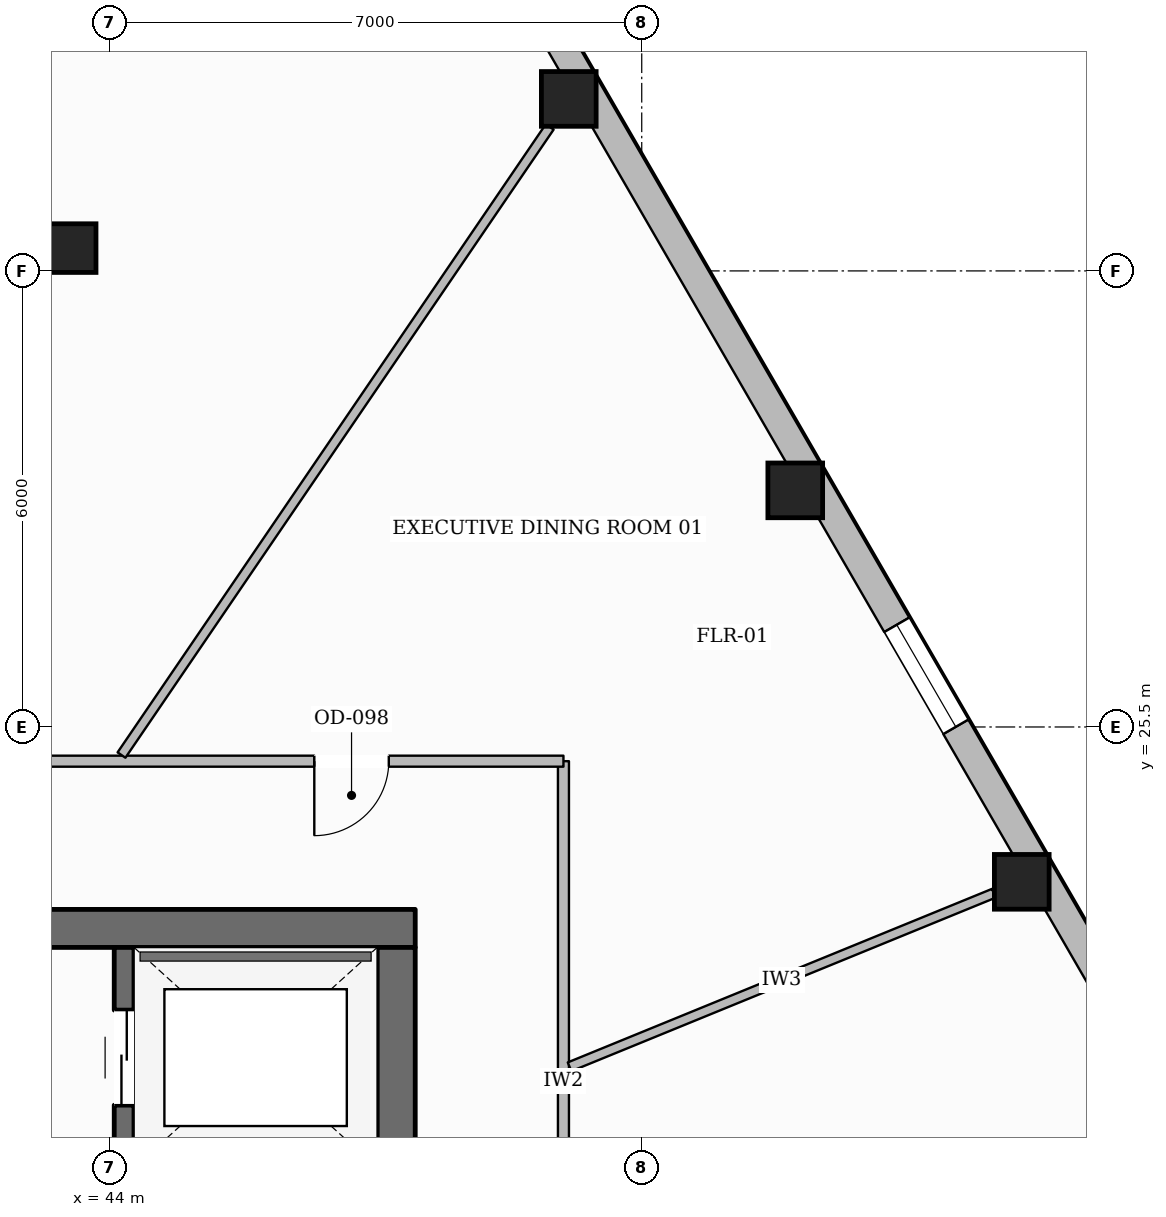
"""IFC4 building model, lengths in metres.
Left out: names, types, materials, properties, quantities, classifications, styles, units other than length and angle.
Written with IfcOpenShell. Run it as: python <this file> out.ifc"""

import sys

from ifc_helpers import new_model, si_unit, direction, frame, frame_2d, origin, origin_2d, place, context, subcontext, project, spatial, rectangle, hollow_rectangle, extrude, element, fill, save


model = new_model("IFC4")
c1 = context("Model", 3, precision=1e-05, world=origin(), true_north=direction((0.0, 1.0)))
c2 = subcontext(c1, "Body", "Model", "MODEL_VIEW")
j1 = project(units=[si_unit("LENGTHUNIT", "METRE"), si_unit("PLANEANGLEUNIT", "RADIAN")], contexts=[c1])
p1 = place(None, origin())
s1 = spatial("IfcSite", under=j1, at=p1, CompositionType="ELEMENT")
p2 = place(p1, origin())
s2 = spatial("IfcBuilding", under=s1, at=p2, CompositionType="ELEMENT")
p3 = place(p2, frame((0.0, 0.0, 112.45)))
s3 = spatial("IfcBuildingStorey", under=s2, at=p3, CompositionType="ELEMENT", Elevation=112.45)
p4 = place(p3, frame((27.98, 22.85, 0.0), z_axis=(0.0, 0.0, 1.0), x_axis=(1.0, 0.0, 0.0)))
e1 = element("IfcWall", 1, at=p4, inside=s3, PredefinedType="SOLIDWALL", context=c2, shape_type="SweptSolid", body=[
    extrude(rectangle(XDim=20.04, YDim=0.5, at=frame_2d((10.02, 0.0))), origin(), (0.0, 0.0, 1.0), 3.6),
])
p5 = place(p4, frame((6.295, 0.0, 0.0)))
e2 = element("IfcOpeningElement", 2, at=p5, cuts=e1, PredefinedType="OPENING", context=c2, shape_type="SweptSolid", body=[
    extrude(rectangle(XDim=1.05, YDim=2.15, at=frame_2d((0.525, 1.075))), frame((0.0, 0.26, 0.0), z_axis=(0.0, -1.0, 0.0), x_axis=(1.0, 0.0, 0.0)), (0.0, 0.0, 1.0), 0.52),
])
p6 = place(p4, frame((12.695, 0.0, 0.0)))
e3 = element("IfcOpeningElement", 3, at=p6, cuts=e1, PredefinedType="OPENING", context=c2, shape_type="SweptSolid", body=[
    extrude(rectangle(XDim=1.05, YDim=2.15, at=frame_2d((0.525, 1.075))), frame((0.0, 0.26, 0.0), z_axis=(0.0, -1.0, 0.0), x_axis=(1.0, 0.0, 0.0)), (0.0, 0.0, 1.0), 0.52),
])
p7 = place(p3, frame((47.77, 9.6, 0.0), z_axis=(0.0, 0.0, 1.0), x_axis=(0.0, 1.0, 0.0)))
e4 = element("IfcWall", 4, at=p7, inside=s3, PredefinedType="SOLIDWALL", context=c2, shape_type="SweptSolid", body=[
    extrude(rectangle(XDim=13.0, YDim=0.5, at=frame_2d((6.5, 0.0))), origin(), (0.0, 0.0, 1.0), 3.6),
])
p8 = place(p7, frame((0.2, 0.0, 0.0)))
e5 = element("IfcOpeningElement", 5, at=p8, cuts=e4, PredefinedType="OPENING", context=c2, shape_type="SweptSolid", body=[
    extrude(rectangle(XDim=1.1, YDim=2.15, at=frame_2d((0.55, 1.075))), frame((0.0, 0.26, 0.0), z_axis=(0.0, -1.0, 0.0), x_axis=(1.0, 0.0, 0.0)), (0.0, 0.0, 1.0), 0.52),
])
p9 = place(p7, frame((8.4, 0.0, 0.0)))
e6 = element("IfcOpeningElement", 6, at=p9, cuts=e4, PredefinedType="OPENING", context=c2, shape_type="SweptSolid", body=[
    extrude(rectangle(XDim=0.9, YDim=2.1, at=frame_2d((0.45, 1.05))), frame((0.0, 0.26, 0.0), z_axis=(0.0, -1.0, 0.0), x_axis=(1.0, 0.0, 0.0)), (0.0, 0.0, 1.0), 0.52),
])
p10 = place(p3, frame((44.19, 9.6, 0.0), z_axis=(0.0, 0.0, 1.0), x_axis=(0.0, 1.0, 0.0)))
e7 = element("IfcWall", 7, at=p10, inside=s3, PredefinedType="SHEAR", context=c2, shape_type="SweptSolid", body=[
    extrude(rectangle(XDim=13.0, YDim=0.26, at=frame_2d((6.5, 0.0))), origin(), (0.0, 0.0, 1.0), 3.6),
])
p11 = place(p10, frame((10.925, 0.0, 0.0)))
e8 = element("IfcOpeningElement", 8, at=p11, cuts=e7, PredefinedType="OPENING", context=c2, shape_type="SweptSolid", body=[
    extrude(rectangle(XDim=1.25, YDim=2.25, at=frame_2d((0.625, 1.125))), frame((0.0, 0.14, 0.0), z_axis=(0.0, -1.0, 0.0), x_axis=(1.0, 0.0, 0.0)), (0.0, 0.0, 1.0), 0.28),
])
for number, where, z_axis, x_axis in (
    (9, (56.0, 23.463, 0.0), (0.0, 0.0, 1.0), (1.0, 0.0, 0.0)),
    (10, (53.02, 28.613, 0.0), (0.0, 0.0, 1.0), (1.0, 0.0, 0.0)),
    (11, (50.04, 33.763, 0.0), (0.0, 0.0, 1.0), (1.0, 0.0, 0.0)),
):
    element("IfcColumn", number, at=place(p3, frame(where, z_axis=z_axis, x_axis=x_axis)), inside=s3, PredefinedType="COLUMN", context=c2, shape_type="SweptSolid", body=[
        extrude(hollow_rectangle(XDim=0.72, YDim=0.72, WallThickness=0.032, at=origin_2d()), origin(), (0.0, 0.0, 1.0), 3.6),
    ])
p12 = place(p3, frame((43.5, 31.8, 0.0), z_axis=(0.0, 0.0, 1.0), x_axis=(1.0, 0.0, 0.0)))
e12 = element("IfcColumn", 12, at=p12, inside=s3, PredefinedType="COLUMN", context=c2, shape_type="SweptSolid", body=[
    extrude(hollow_rectangle(XDim=0.64, YDim=0.64, WallThickness=0.028, at=origin_2d()), origin(), (0.0, 0.0, 1.0), 3.6),
])
p13 = place(p3, frame((44.076, 44.609, 0.0), z_axis=(0.0, 0.0, 1.0), x_axis=(0.500826973377, -0.865547423737, 0.0)))
e13 = element("IfcWall", 13, at=p13, inside=s3, PredefinedType="STANDARD", context=c2, shape_type="SweptSolid", body=[
    extrude(rectangle(XDim=36.65, YDim=0.38, at=frame_2d((18.325, 0.0))), origin(), (0.0, 0.0, 1.0), 3.059),
])
p14 = place(p13, frame((26.887, 0.0, 0.0)))
e14 = element("IfcOpeningElement", 14, at=p14, cuts=e13, PredefinedType="OPENING", context=c2, shape_type="SweptSolid", body=[
    extrude(rectangle(XDim=1.0, YDim=2.2, at=frame_2d((0.5, 1.1))), frame((0.0, 0.2, 0.0), z_axis=(0.0, -1.0, 0.0), x_axis=(1.0, 0.0, 0.0)), (0.0, 0.0, 1.0), 0.4),
])
p15 = place(p13, frame((32.424, 0.0, 0.65)))
e15 = element("IfcOpeningElement", 15, at=p15, cuts=e13, PredefinedType="OPENING", context=c2, shape_type="SweptSolid", body=[
    extrude(rectangle(XDim=1.55, YDim=1.75, at=frame_2d((0.775, 0.875))), frame((0.0, 0.2, 0.0), z_axis=(0.0, -1.0, 0.0), x_axis=(1.0, 0.0, 0.0)), (0.0, 0.0, 1.0), 0.4),
])
p16 = place(p13, frame((20.524, 0.0, 0.65)))
e16 = element("IfcOpeningElement", 16, at=p16, cuts=e13, PredefinedType="OPENING", context=c2, shape_type="SweptSolid", body=[
    extrude(rectangle(XDim=1.55, YDim=1.75, at=frame_2d((0.775, 0.875))), frame((0.0, 0.2, 0.0), z_axis=(0.0, -1.0, 0.0), x_axis=(1.0, 0.0, 0.0)), (0.0, 0.0, 1.0), 0.4),
])
p17 = place(p13, frame((8.625, 0.0, 0.65)))
e17 = element("IfcOpeningElement", 17, at=p17, cuts=e13, PredefinedType="OPENING", context=c2, shape_type="SweptSolid", body=[
    extrude(rectangle(XDim=1.55, YDim=1.75, at=frame_2d((0.775, 0.875))), frame((0.0, 0.2, 0.0), z_axis=(0.0, -1.0, 0.0), x_axis=(1.0, 0.0, 0.0)), (0.0, 0.0, 1.0), 0.4),
])
p18 = place(p13, frame((2.675, 0.0, 0.65)))
e18 = element("IfcOpeningElement", 18, at=p18, cuts=e13, PredefinedType="OPENING", context=c2, shape_type="SweptSolid", body=[
    extrude(rectangle(XDim=1.55, YDim=1.75, at=frame_2d((0.775, 0.875))), frame((0.0, 0.2, 0.0), z_axis=(0.0, -1.0, 0.0), x_axis=(1.0, 0.0, 0.0)), (0.0, 0.0, 1.0), 0.4),
])
p19 = place(p3, frame((49.97, 7.15, 0.0), z_axis=(0.0, 0.0, 1.0), x_axis=(0.0, 1.0, 0.0)))
e19 = element("IfcWall", 19, at=p19, inside=s3, PredefinedType="PARTITIONING", context=c2, shape_type="SweptSolid", body=[
    extrude(rectangle(XDim=17.9, YDim=0.145, at=frame_2d((8.95, 0.0))), origin(), (0.0, 0.0, 1.0), 3.288),
])
p20 = place(p19, frame((8.222, 0.0, 0.0)))
e20 = element("IfcOpeningElement", 20, at=p20, cuts=e19, PredefinedType="OPENING", context=c2, shape_type="SweptSolid", body=[
    extrude(rectangle(XDim=1.02, YDim=2.15, at=frame_2d((0.51, 1.075))), frame((0.0, 0.083, 0.0), z_axis=(0.0, -1.0, 0.0), x_axis=(1.0, 0.0, 0.0)), (0.0, 0.0, 1.0), 0.165),
])
p21 = place(p3, frame((49.97, 25.05, 0.0), z_axis=(0.0, 0.0, 1.0), x_axis=(-1.0, 0.0, 0.0)))
e21 = element("IfcWall", 21, at=p21, inside=s3, PredefinedType="PARTITIONING", context=c2, shape_type="SweptSolid", body=[
    extrude(rectangle(XDim=23.94, YDim=0.145, at=frame_2d((11.97, 0.0))), origin(), (0.0, 0.0, 1.0), 3.6),
])
p22 = place(p21, frame((14.53, 0.0, 0.0)))
e22 = element("IfcOpeningElement", 22, at=p22, cuts=e21, PredefinedType="OPENING", context=c2, shape_type="SweptSolid", body=[
    extrude(rectangle(XDim=0.88, YDim=2.1, at=frame_2d((0.44, 1.05))), frame((0.0, 0.083, 0.0), z_axis=(0.0, -1.0, 0.0), x_axis=(1.0, 0.0, 0.0)), (0.0, 0.0, 1.0), 0.165),
])
p23 = place(p21, frame((12.01, 0.0, 0.0)))
e23 = element("IfcOpeningElement", 23, at=p23, cuts=e21, PredefinedType="OPENING", context=c2, shape_type="SweptSolid", body=[
    extrude(rectangle(XDim=0.88, YDim=2.1, at=frame_2d((0.44, 1.05))), frame((0.0, 0.083, 0.0), z_axis=(0.0, -1.0, 0.0), x_axis=(1.0, 0.0, 0.0)), (0.0, 0.0, 1.0), 0.165),
])
p24 = place(p21, frame((9.55, 0.0, 0.0)))
e24 = element("IfcOpeningElement", 24, at=p24, cuts=e21, PredefinedType="OPENING", context=c2, shape_type="SweptSolid", body=[
    extrude(rectangle(XDim=0.96, YDim=2.1, at=frame_2d((0.48, 1.05))), frame((0.0, 0.083, 0.0), z_axis=(0.0, -1.0, 0.0), x_axis=(1.0, 0.0, 0.0)), (0.0, 0.0, 1.0), 0.165),
])
p25 = place(p21, frame((2.298, 0.0, 0.0)))
e25 = element("IfcOpeningElement", 25, at=p25, cuts=e21, PredefinedType="OPENING", context=c2, shape_type="SweptSolid", body=[
    extrude(rectangle(XDim=0.98, YDim=2.15, at=frame_2d((0.49, 1.075))), frame((0.0, 0.083, 0.0), z_axis=(0.0, -1.0, 0.0), x_axis=(1.0, 0.0, 0.0)), (0.0, 0.0, 1.0), 0.165),
])
p26 = place(p21, frame((18.547, 0.0, 0.0)))
e26 = element("IfcOpeningElement", 26, at=p26, cuts=e21, PredefinedType="OPENING", context=c2, shape_type="SweptSolid", body=[
    extrude(rectangle(XDim=1.4, YDim=2.2, at=frame_2d((0.7, 1.1))), frame((0.0, 0.083, 0.0), z_axis=(0.0, -1.0, 0.0), x_axis=(1.0, 0.0, 0.0)), (0.0, 0.0, 1.0), 0.165),
])
p27 = place(p3, frame((50.051, 21.029, 0.0), z_axis=(0.0, 0.0, 1.0), x_axis=(0.925558564756, 0.378604468024, 0.0)))
e27 = element("IfcWall", 27, at=p27, inside=s3, PredefinedType="PARTITIONING", context=c2, shape_type="SweptSolid", body=[
    extrude(rectangle(XDim=6.03, YDim=0.125, at=frame_2d((3.015, 0.0))), origin(), (0.0, 0.0, 1.0), 3.141),
])
p28 = place(p3, frame((44.156, 25.131, 0.0), z_axis=(0.0, 0.0, 1.0), x_axis=(0.563244412967, 0.826290343197, 0.0)))
e28 = element("IfcWall", 28, at=p28, inside=s3, PredefinedType="PARTITIONING", context=c2, shape_type="SweptSolid", body=[
    extrude(rectangle(XDim=10.001, YDim=0.125, at=frame_2d((5.001, 0.0))), origin(), (0.0, 0.0, 1.0), 3.6),
])
p29 = place(p3, frame((49.439, 35.04, 0.0), z_axis=(0.0, 0.0, 1.0), x_axis=(-0.998667112639, -0.051613933513, 0.0)))
e29 = element("IfcWall", 29, at=p29, inside=s3, PredefinedType="PARTITIONING", context=c2, shape_type="SweptSolid", body=[
    extrude(rectangle(XDim=22.851, YDim=0.125, at=frame_2d((11.426, 0.0))), origin(), (0.0, 0.0, 1.0), 3.6),
])
p30 = place(p29, frame((10.936, 0.0, 0.0)))
e30 = element("IfcOpeningElement", 30, at=p30, cuts=e29, PredefinedType="OPENING", context=c2, shape_type="SweptSolid", body=[
    extrude(rectangle(XDim=0.98, YDim=2.15, at=frame_2d((0.49, 1.075))), frame((0.0, 0.073, 0.0), z_axis=(0.0, -1.0, 0.0), x_axis=(1.0, 0.0, 0.0)), (0.0, 0.0, 1.0), 0.145),
])
p31 = place(p16, origin())
e31 = element("IfcWindow", 31, at=p31, inside=s3, PartitioningType="SINGLE_PANEL", PredefinedType="WINDOW", context=c2, shape_type="SweptSolid", body=[
    extrude(rectangle(XDim=1.55, YDim=1.75, at=frame_2d((0.775, 0.875))), frame((0.0, 0.03, 0.0), z_axis=(0.0, -1.0, 0.0), x_axis=(1.0, 0.0, 0.0)), (0.0, 0.0, 1.0), 0.06),
])
fill(e16, e31)
p32 = place(p11, origin())
e32 = element("IfcDoor", 32, at=p32, inside=s3, OperationType="DOUBLE_DOOR_SLIDING", PredefinedType="DOOR", context=c2, shape_type="SweptSolid", body=[
    extrude(rectangle(XDim=1.25, YDim=2.25, at=frame_2d((0.625, 1.125))), frame((0.0, 0.025, 0.0), z_axis=(0.0, -1.0, 0.0), x_axis=(1.0, 0.0, 0.0)), (0.0, 0.0, 1.0), 0.05),
])
fill(e8, e32)
p33 = place(p25, origin())
e33 = element("IfcDoor", 33, at=p33, inside=s3, OperationType="SINGLE_SWING_RIGHT", PredefinedType="DOOR", context=c2, shape_type="SweptSolid", body=[
    extrude(rectangle(XDim=0.98, YDim=2.15, at=frame_2d((0.49, 1.075))), frame((0.0, 0.025, 0.0), z_axis=(0.0, -1.0, 0.0), x_axis=(1.0, 0.0, 0.0)), (0.0, 0.0, 1.0), 0.05),
])
fill(e25, e33)
save(model, sys.argv[1])
